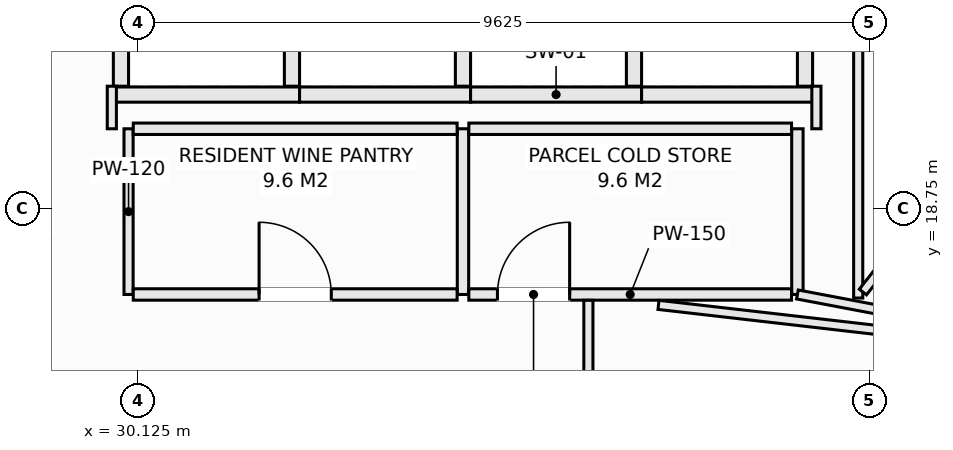
"""IFC4 building model, lengths in metres.
Left out: names, types, materials, properties, quantities, classifications, styles, units other than length and angle.
Written with IfcOpenShell. Run it as: python <this file> out.ifc"""

import sys

from ifc_helpers import new_model, si_unit, direction, frame, frame_2d, origin, place, context, subcontext, project, spatial, rectangle, extrude, element, fill, save


model = new_model("IFC4")
c1 = context("Model", 3, precision=1e-05, world=origin(), true_north=direction((0.0, 1.0)))
c2 = subcontext(c1, "Body", "Model", "MODEL_VIEW")
j1 = project(units=[si_unit("LENGTHUNIT", "METRE"), si_unit("PLANEANGLEUNIT", "RADIAN")], contexts=[c1])
p1 = place(None, origin())
s1 = spatial("IfcSite", under=j1, at=p1, CompositionType="ELEMENT")
p2 = place(p1, origin())
s2 = spatial("IfcBuilding", under=s1, at=p2, CompositionType="ELEMENT")
p3 = place(p2, frame((0.0, 0.0, 259.1)))
s3 = spatial("IfcBuildingStorey", under=s2, at=p3, CompositionType="ELEMENT", Elevation=259.1)
p4 = place(p3, frame((29.8, 20.25, 0.0), z_axis=(0.0, 0.0, 1.0), x_axis=(1.0, 0.0, 0.0)))
e1 = element("IfcWall", 1, at=p4, inside=s3, PredefinedType="SOLIDWALL", context=c2, shape_type="SweptSolid", body=[
    extrude(rectangle(XDim=2.45, YDim=0.2, at=frame_2d((1.225, 0.0))), origin(), (0.0, 0.0, 1.0), 3.03),
])
for number, where, z_axis, x_axis in (
    (2, (29.9, 20.36, 0.0), (0.0, 0.0, 1.0), (0.0, 1.0, 0.0)),
    (3, (32.15, 20.36, 0.0), (0.0, 0.0, 1.0), (0.0, 1.0, 0.0)),
):
    element("IfcWall", number, at=place(p3, frame(where, z_axis=z_axis, x_axis=x_axis)), inside=s3, PredefinedType="SOLIDWALL", context=c2, shape_type="SweptSolid", body=[
        extrude(rectangle(XDim=2.43, YDim=0.2, at=frame_2d((1.215, 0.0))), origin(), (0.0, 0.0, 1.0), 3.03),
    ])
p5 = place(p3, frame((32.25, 20.25, 0.0), z_axis=(0.0, 0.0, 1.0), x_axis=(1.0, 0.0, 0.0)))
e4 = element("IfcWall", 4, at=p5, inside=s3, PredefinedType="SOLIDWALL", context=c2, shape_type="SweptSolid", body=[
    extrude(rectangle(XDim=2.25, YDim=0.2, at=frame_2d((1.125, 0.0))), origin(), (0.0, 0.0, 1.0), 3.03),
])
p6 = place(p3, frame((34.4, 20.36, 0.0), z_axis=(0.0, 0.0, 1.0), x_axis=(0.0, 1.0, 0.0)))
e5 = element("IfcWall", 5, at=p6, inside=s3, PredefinedType="SOLIDWALL", context=c2, shape_type="SweptSolid", body=[
    extrude(rectangle(XDim=2.43, YDim=0.2, at=frame_2d((1.215, 0.0))), origin(), (0.0, 0.0, 1.0), 3.03),
])
p7 = place(p3, frame((34.5, 20.25, 0.0), z_axis=(0.0, 0.0, 1.0), x_axis=(1.0, 0.0, 0.0)))
e6 = element("IfcWall", 6, at=p7, inside=s3, PredefinedType="SOLIDWALL", context=c2, shape_type="SweptSolid", body=[
    extrude(rectangle(XDim=2.25, YDim=0.2, at=frame_2d((1.125, 0.0))), origin(), (0.0, 0.0, 1.0), 3.03),
])
p8 = place(p3, frame((36.65, 20.36, 0.0), z_axis=(0.0, 0.0, 1.0), x_axis=(0.0, 1.0, 0.0)))
e7 = element("IfcWall", 7, at=p8, inside=s3, PredefinedType="SOLIDWALL", context=c2, shape_type="SweptSolid", body=[
    extrude(rectangle(XDim=2.43, YDim=0.2, at=frame_2d((1.215, 0.0))), origin(), (0.0, 0.0, 1.0), 3.03),
])
p9 = place(p3, frame((36.75, 20.25, 0.0), z_axis=(0.0, 0.0, 1.0), x_axis=(1.0, 0.0, 0.0)))
e8 = element("IfcWall", 8, at=p9, inside=s3, PredefinedType="SOLIDWALL", context=c2, shape_type="SweptSolid", body=[
    extrude(rectangle(XDim=2.25, YDim=0.2, at=frame_2d((1.125, 0.0))), origin(), (0.0, 0.0, 1.0), 3.03),
])
p10 = place(p3, frame((38.9, 20.36, 0.0), z_axis=(0.0, 0.0, 1.0), x_axis=(0.0, 1.0, 0.0)))
e9 = element("IfcWall", 9, at=p10, inside=s3, PredefinedType="SOLIDWALL", context=c2, shape_type="SweptSolid", body=[
    extrude(rectangle(XDim=2.43, YDim=0.2, at=frame_2d((1.215, 0.0))), origin(), (0.0, 0.0, 1.0), 3.03),
])
p11 = place(p3, frame((30.0, 17.62, 0.0), z_axis=(0.0, 0.0, 1.0), x_axis=(0.0, 1.0, 0.0)))
e10 = element("IfcWall", 10, at=p11, inside=s3, PredefinedType="PARTITIONING", context=c2, shape_type="SweptSolid", body=[
    extrude(rectangle(XDim=2.18, YDim=0.12, at=frame_2d((1.09, 0.0))), origin(), (0.0, 0.0, 1.0), 3.03),
])
for number, where, z_axis, x_axis in (
    (11, (38.8, 17.62, 0.0), (0.0, 0.0, 1.0), (0.0, 1.0, 0.0)),
    (12, (34.4, 17.62, 0.0), (0.0, 0.0, 1.0), (0.0, 1.0, 0.0)),
):
    element("IfcWall", number, at=place(p3, frame(where, z_axis=z_axis, x_axis=x_axis)), inside=s3, PredefinedType="PARTITIONING", context=c2, shape_type="SweptSolid", body=[
        extrude(rectangle(XDim=2.18, YDim=0.15, at=frame_2d((1.09, 0.0))), origin(), (0.0, 0.0, 1.0), 3.03),
    ])
p12 = place(p3, frame((30.062, 17.62, 0.0), z_axis=(0.0, 0.0, 1.0), x_axis=(1.0, 0.0, 0.0)))
e13 = element("IfcWall", 13, at=p12, inside=s3, PredefinedType="PARTITIONING", context=c2, shape_type="SweptSolid", body=[
    extrude(rectangle(XDim=4.261, YDim=0.15, at=frame_2d((2.13, 0.0))), origin(), (0.0, 0.0, 1.0), 3.03),
])
p13 = place(p12, frame((1.656, 0.0, 0.0)))
e14 = element("IfcOpeningElement", 14, at=p13, cuts=e13, PredefinedType="OPENING", context=c2, shape_type="SweptSolid", body=[
    extrude(rectangle(XDim=0.95, YDim=2.1, at=frame_2d((0.475, 1.05))), frame((0.0, 0.085, 0.0), z_axis=(0.0, -1.0, 0.0), x_axis=(1.0, 0.0, 0.0)), (0.0, 0.0, 1.0), 0.17),
])
p14 = place(p3, frame((34.477, 17.62, 0.0), z_axis=(0.0, 0.0, 1.0), x_axis=(1.0, 0.0, 0.0)))
e15 = element("IfcWall", 15, at=p14, inside=s3, PredefinedType="PARTITIONING", context=c2, shape_type="SweptSolid", body=[
    extrude(rectangle(XDim=4.246, YDim=0.15, at=frame_2d((2.123, 0.0))), origin(), (0.0, 0.0, 1.0), 3.03),
])
p15 = place(p14, frame((0.376, 0.0, 0.0)))
e16 = element("IfcOpeningElement", 16, at=p15, cuts=e15, PredefinedType="OPENING", context=c2, shape_type="SweptSolid", body=[
    extrude(rectangle(XDim=0.95, YDim=2.1, at=frame_2d((0.475, 1.05))), frame((0.0, 0.085, 0.0), z_axis=(0.0, -1.0, 0.0), x_axis=(1.0, 0.0, 0.0)), (0.0, 0.0, 1.0), 0.17),
])
p16 = place(p3, frame((30.062, 19.8, 0.0), z_axis=(0.0, 0.0, 1.0), x_axis=(1.0, 0.0, 0.0)))
e17 = element("IfcWall", 17, at=p16, inside=s3, PredefinedType="PARTITIONING", context=c2, shape_type="SweptSolid", body=[
    extrude(rectangle(XDim=4.261, YDim=0.15, at=frame_2d((2.13, 0.0))), origin(), (0.0, 0.0, 1.0), 3.03),
])
p17 = place(p3, frame((34.477, 19.8, 0.0), z_axis=(0.0, 0.0, 1.0), x_axis=(1.0, 0.0, 0.0)))
e18 = element("IfcWall", 18, at=p17, inside=s3, PredefinedType="PARTITIONING", context=c2, shape_type="SweptSolid", body=[
    extrude(rectangle(XDim=4.246, YDim=0.15, at=frame_2d((2.123, 0.0))), origin(), (0.0, 0.0, 1.0), 3.03),
])
p18 = place(p3, frame((39.05, 19.8, 0.0), z_axis=(0.0, 0.0, 1.0), x_axis=(0.0, 1.0, 0.0)))
e19 = element("IfcWall", 19, at=p18, inside=s3, PredefinedType="PARTITIONING", context=c2, shape_type="SweptSolid", body=[
    extrude(rectangle(XDim=0.56, YDim=0.12, at=frame_2d((0.28, 0.0))), origin(), (0.0, 0.0, 1.0), 3.03),
])
p19 = place(p3, frame((39.6, 17.573, 0.0), z_axis=(0.0, 0.0, 1.0), x_axis=(0.0, 1.0, 0.0)))
e20 = element("IfcWall", 20, at=p19, inside=s3, PredefinedType="PARTITIONING", context=c2, shape_type="SweptSolid", body=[
    extrude(rectangle(XDim=5.447, YDim=0.12, at=frame_2d((2.724, 0.0))), origin(), (0.0, 0.0, 1.0), 2.478),
])
p20 = place(p3, frame((39.662, 17.652, 0.0), z_axis=(0.0, 0.0, 1.0), x_axis=(0.616212345115, 0.78758005671, 0.0)))
e21 = element("IfcWall", 21, at=p20, inside=s3, PredefinedType="PARTITIONING", context=c2, shape_type="SweptSolid", body=[
    extrude(rectangle(XDim=2.333, YDim=0.12, at=frame_2d((1.167, 0.0))), origin(), (0.0, 0.0, 1.0), 2.478),
])
p21 = place(p3, frame((29.78, 19.8, 0.0), z_axis=(0.0, 0.0, 1.0), x_axis=(0.0, 1.0, 0.0)))
e22 = element("IfcWall", 22, at=p21, inside=s3, PredefinedType="PARTITIONING", context=c2, shape_type="SweptSolid", body=[
    extrude(rectangle(XDim=0.56, YDim=0.12, at=frame_2d((0.28, 0.0))), origin(), (0.0, 0.0, 1.0), 3.03),
])
p22 = place(p3, frame((36.05, 14.95, 0.0), z_axis=(0.0, 0.0, 1.0), x_axis=(0.0, 1.0, 0.0)))
e23 = element("IfcWall", 23, at=p22, inside=s3, PredefinedType="PARTITIONING", context=c2, shape_type="SweptSolid", body=[
    extrude(rectangle(XDim=2.593, YDim=0.12, at=frame_2d((1.296, 0.0))), origin(), (0.0, 0.0, 1.0), 3.03),
])
p23 = place(p3, frame((36.972, 17.483, 0.0), z_axis=(0.0, 0.0, 1.0), x_axis=(0.993465006101, -0.114137117773, 0.0)))
e24 = element("IfcWall", 24, at=p23, inside=s3, PredefinedType="PARTITIONING", context=c2, shape_type="SweptSolid", body=[
    extrude(rectangle(XDim=6.413, YDim=0.12, at=frame_2d((3.207, 0.0))), origin(), (0.0, 0.0, 1.0), 2.77),
])
p24 = place(p3, frame((38.8, 17.62, 0.0), z_axis=(0.0, 0.0, 1.0), x_axis=(0.982513005499, -0.186193968823, 0.0)))
e25 = element("IfcWall", 25, at=p24, inside=s3, PredefinedType="PARTITIONING", context=c2, shape_type="SweptSolid", body=[
    extrude(rectangle(XDim=2.676, YDim=0.12, at=frame_2d((1.338, 0.0))), origin(), (0.0, 0.0, 1.0), 3.03),
])
p25 = place(p13, origin())
e26 = element("IfcDoor", 26, at=p25, inside=s3, OperationType="SINGLE_SWING_LEFT", PredefinedType="DOOR", context=c2, shape_type="SweptSolid", body=[
    extrude(rectangle(XDim=0.95, YDim=2.1, at=frame_2d((0.475, 1.05))), frame((0.0, 0.025, 0.0), z_axis=(0.0, -1.0, 0.0), x_axis=(1.0, 0.0, 0.0)), (0.0, 0.0, 1.0), 0.05),
])
fill(e14, e26)
p26 = place(p15, origin())
e27 = element("IfcDoor", 27, at=p26, inside=s3, OperationType="SINGLE_SWING_RIGHT", PredefinedType="DOOR", context=c2, shape_type="SweptSolid", body=[
    extrude(rectangle(XDim=0.95, YDim=2.1, at=frame_2d((0.475, 1.05))), frame((0.0, 0.025, 0.0), z_axis=(0.0, -1.0, 0.0), x_axis=(1.0, 0.0, 0.0)), (0.0, 0.0, 1.0), 0.05),
])
fill(e16, e27)
save(model, sys.argv[1])
